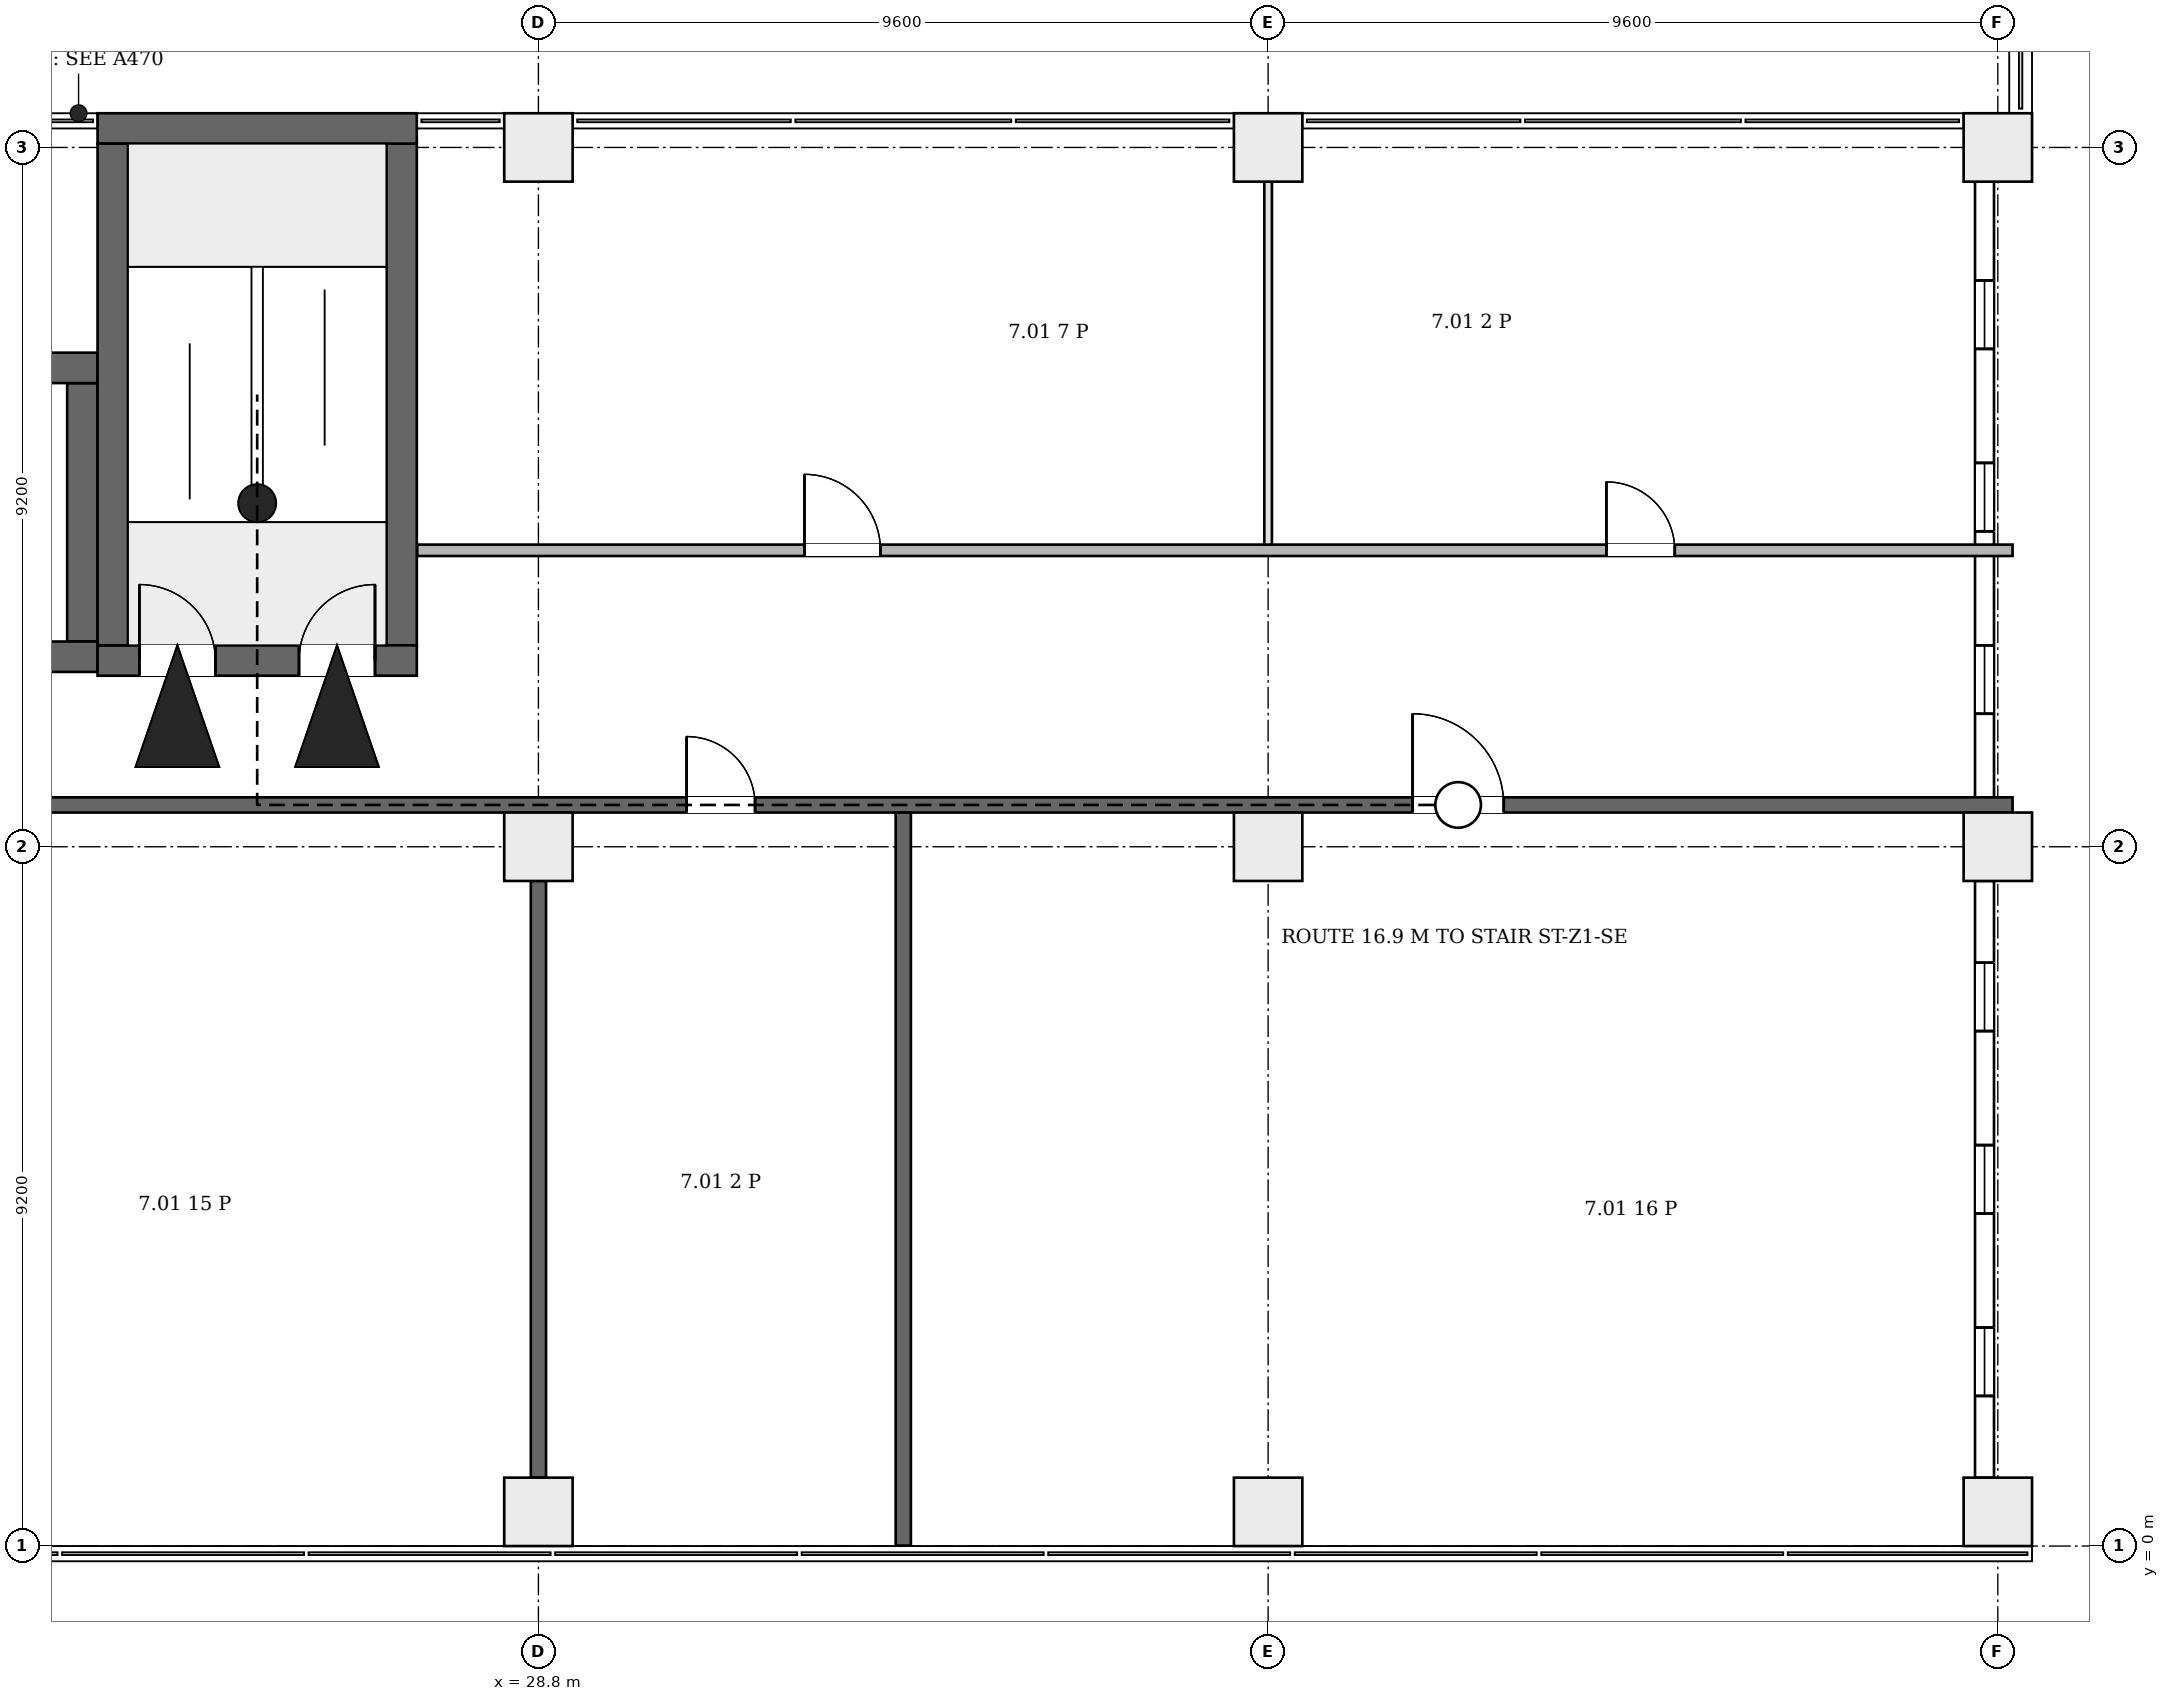
"""IFC4 building model, lengths in metres.
Left out: names, types, materials, properties, quantities, classifications, styles, units other than length and angle.
Written with IfcOpenShell. Run it as: python <this file> out.ifc"""

import sys

from ifc_helpers import new_model, si_unit, direction, frame, frame_2d, origin, origin_2d, place, context, subcontext, project, spatial, rectangle, extrude, element, fill, save


model = new_model("IFC4")
c1 = context("Model", 3, precision=1e-05, world=origin(), true_north=direction((0.0, 1.0)))
c2 = subcontext(c1, "Body", "Model", "MODEL_VIEW")
j1 = project(units=[si_unit("LENGTHUNIT", "METRE"), si_unit("PLANEANGLEUNIT", "RADIAN")], contexts=[c1])
p1 = place(None, origin())
s1 = spatial("IfcSite", under=j1, at=p1, CompositionType="ELEMENT")
p2 = place(p1, origin())
s2 = spatial("IfcBuilding", under=s1, at=p2, CompositionType="ELEMENT")
p3 = place(p2, frame((0.0, 0.0, 40.3)))
s3 = spatial("IfcBuildingStorey", under=s2, at=p3, CompositionType="ELEMENT", Elevation=40.3)
p4 = place(p3, frame((23.0, 11.65, 0.0), z_axis=(0.0, 0.0, 1.0), x_axis=(1.0, 0.0, 0.0)))
e1 = element("IfcWall", 1, at=p4, inside=s3, PredefinedType="SHEAR", context=c2, shape_type="SweptSolid", body=[
    extrude(rectangle(XDim=4.2, YDim=0.4, at=frame_2d((2.1, 0.0))), origin(), (0.0, 0.0, 1.0), 4.2),
])
p5 = place(p4, frame((0.55, 0.0, 0.0)))
e2 = element("IfcOpeningElement", 2, at=p5, cuts=e1, PredefinedType="OPENING", context=c2, shape_type="SweptSolid", body=[
    extrude(rectangle(XDim=1.0, YDim=2.1, at=frame_2d((0.5, 1.05))), frame((0.0, 0.21, 0.0), z_axis=(0.0, -1.0, 0.0), x_axis=(1.0, 0.0, 0.0)), (0.0, 0.0, 1.0), 0.42),
])
p6 = place(p4, frame((2.65, 0.0, 0.0)))
e3 = element("IfcOpeningElement", 3, at=p6, cuts=e1, PredefinedType="OPENING", context=c2, shape_type="SweptSolid", body=[
    extrude(rectangle(XDim=1.0, YDim=2.1, at=frame_2d((0.5, 1.05))), frame((0.0, 0.21, 0.0), z_axis=(0.0, -1.0, 0.0), x_axis=(1.0, 0.0, 0.0)), (0.0, 0.0, 1.0), 0.42),
])
p7 = place(p3, frame((23.0, 18.65, 0.0), z_axis=(0.0, 0.0, 1.0), x_axis=(1.0, 0.0, 0.0)))
e4 = element("IfcWall", 4, at=p7, inside=s3, PredefinedType="SHEAR", context=c2, shape_type="SweptSolid", body=[
    extrude(rectangle(XDim=4.2, YDim=0.4, at=frame_2d((2.1, 0.0))), origin(), (0.0, 0.0, 1.0), 4.2),
])
for number, where, z_axis, x_axis in (
    (5, (23.2, 11.85, 0.0), (0.0, 0.0, 1.0), (0.0, 1.0, 0.0)),
    (6, (27.0, 11.85, 0.0), (0.0, 0.0, 1.0), (0.0, 1.0, 0.0)),
):
    element("IfcWall", number, at=place(p3, frame(where, z_axis=z_axis, x_axis=x_axis)), inside=s3, PredefinedType="SHEAR", context=c2, shape_type="SweptSolid", body=[
        extrude(rectangle(XDim=6.6, YDim=0.4, at=frame_2d((3.3, 0.0))), origin(), (0.0, 0.0, 1.0), 4.2),
    ])
p8 = place(p3, frame((19.9, 11.7, 0.0), z_axis=(0.0, 0.0, 1.0), x_axis=(1.0, 0.0, 0.0)))
e7 = element("IfcWall", 7, at=p8, inside=s3, PredefinedType="SHEAR", context=c2, shape_type="SweptSolid", body=[
    extrude(rectangle(XDim=3.1, YDim=0.4, at=frame_2d((1.55, 0.0))), origin(), (0.0, 0.0, 1.0), 4.2),
])
p9 = place(p3, frame((19.9, 15.5, 0.0), z_axis=(0.0, 0.0, 1.0), x_axis=(1.0, 0.0, 0.0)))
e8 = element("IfcWall", 8, at=p9, inside=s3, PredefinedType="SHEAR", context=c2, shape_type="SweptSolid", body=[
    extrude(rectangle(XDim=3.1, YDim=0.4, at=frame_2d((1.55, 0.0))), origin(), (0.0, 0.0, 1.0), 4.2),
])
p10 = place(p9, frame((0.95, 0.0, 0.0)))
e9 = element("IfcOpeningElement", 9, at=p10, cuts=e8, PredefinedType="OPENING", context=c2, shape_type="SweptSolid", body=[
    extrude(rectangle(XDim=1.2, YDim=2.1, at=frame_2d((0.6, 1.05))), frame((0.0, 0.21, 0.0), z_axis=(0.0, -1.0, 0.0), x_axis=(1.0, 0.0, 0.0)), (0.0, 0.0, 1.0), 0.42),
])
p11 = place(p3, frame((22.8, 11.9, 0.0), z_axis=(0.0, 0.0, 1.0), x_axis=(0.0, 1.0, 0.0)))
e10 = element("IfcWall", 10, at=p11, inside=s3, PredefinedType="SHEAR", context=c2, shape_type="SweptSolid", body=[
    extrude(rectangle(XDim=3.4, YDim=0.4, at=frame_2d((1.7, 0.0))), origin(), (0.0, 0.0, 1.0), 4.2),
])
for number, where, z_axis, x_axis in (
    (11, (28.8, 0.45, 0.0), (0.0, 0.0, 1.0), (1.0, 0.0, 0.0)),
    (12, (38.4, 0.45, 0.0), (0.0, 0.0, 1.0), (1.0, 0.0, 0.0)),
    (13, (48.0, 0.45, 0.0), (0.0, 0.0, 1.0), (1.0, 0.0, 0.0)),
    (14, (28.8, 9.2, 0.0), (0.0, 0.0, 1.0), (1.0, 0.0, 0.0)),
    (15, (38.4, 9.2, 0.0), (0.0, 0.0, 1.0), (1.0, 0.0, 0.0)),
    (16, (48.0, 9.2, 0.0), (0.0, 0.0, 1.0), (1.0, 0.0, 0.0)),
    (17, (28.8, 18.4, 0.0), (0.0, 0.0, 1.0), (1.0, 0.0, 0.0)),
    (18, (38.4, 18.4, 0.0), (0.0, 0.0, 1.0), (1.0, 0.0, 0.0)),
    (19, (48.0, 18.4, 0.0), (0.0, 0.0, 1.0), (1.0, 0.0, 0.0)),
):
    element("IfcColumn", number, at=place(p3, frame(where, z_axis=z_axis, x_axis=x_axis)), inside=s3, PredefinedType="COLUMN", context=c2, shape_type="SweptSolid", body=[
        extrude(rectangle(XDim=0.9, YDim=0.9, at=origin_2d()), origin(), (0.0, 0.0, 1.0), 4.2),
    ])
p12 = place(p3, frame((47.825, 0.9, 0.0), z_axis=(0.0, 0.0, 1.0), x_axis=(0.0, 1.0, 0.0)))
e20 = element("IfcWall", 20, at=p12, inside=s3, PredefinedType="ELEMENTEDWALL", context=c2, shape_type="SweptSolid", body=[
    extrude(rectangle(XDim=7.85, YDim=0.25, at=frame_2d((3.925, 0.0))), origin(), (0.0, 0.0, 1.0), 3.3),
])
p13 = place(p12, frame((1.075, 0.0, 0.6)))
e21 = element("IfcOpeningElement", 21, at=p13, cuts=e20, PredefinedType="OPENING", context=c2, shape_type="SweptSolid", body=[
    extrude(rectangle(XDim=0.9, YDim=2.6, at=frame_2d((0.45, 1.3))), frame((0.0, 0.135, 0.0), z_axis=(0.0, -1.0, 0.0), x_axis=(1.0, 0.0, 0.0)), (0.0, 0.0, 1.0), 0.27),
])
p14 = place(p12, frame((3.475, 0.0, 0.6)))
e22 = element("IfcOpeningElement", 22, at=p14, cuts=e20, PredefinedType="OPENING", context=c2, shape_type="SweptSolid", body=[
    extrude(rectangle(XDim=0.9, YDim=2.6, at=frame_2d((0.45, 1.3))), frame((0.0, 0.135, 0.0), z_axis=(0.0, -1.0, 0.0), x_axis=(1.0, 0.0, 0.0)), (0.0, 0.0, 1.0), 0.27),
])
p15 = place(p12, frame((5.875, 0.0, 0.6)))
e23 = element("IfcOpeningElement", 23, at=p15, cuts=e20, PredefinedType="OPENING", context=c2, shape_type="SweptSolid", body=[
    extrude(rectangle(XDim=0.9, YDim=2.6, at=frame_2d((0.45, 1.3))), frame((0.0, 0.135, 0.0), z_axis=(0.0, -1.0, 0.0), x_axis=(1.0, 0.0, 0.0)), (0.0, 0.0, 1.0), 0.27),
])
p16 = place(p3, frame((47.825, 9.65, 0.0), z_axis=(0.0, 0.0, 1.0), x_axis=(0.0, 1.0, 0.0)))
e24 = element("IfcWall", 24, at=p16, inside=s3, PredefinedType="ELEMENTEDWALL", context=c2, shape_type="SweptSolid", body=[
    extrude(rectangle(XDim=8.3, YDim=0.25, at=frame_2d((4.15, 0.0))), origin(), (0.0, 0.0, 1.0), 3.3),
])
p17 = place(p16, frame((1.3, 0.0, 0.6)))
e25 = element("IfcOpeningElement", 25, at=p17, cuts=e24, PredefinedType="OPENING", context=c2, shape_type="SweptSolid", body=[
    extrude(rectangle(XDim=0.9, YDim=2.6, at=frame_2d((0.45, 1.3))), frame((0.0, 0.135, 0.0), z_axis=(0.0, -1.0, 0.0), x_axis=(1.0, 0.0, 0.0)), (0.0, 0.0, 1.0), 0.27),
])
p18 = place(p16, frame((3.7, 0.0, 0.6)))
e26 = element("IfcOpeningElement", 26, at=p18, cuts=e24, PredefinedType="OPENING", context=c2, shape_type="SweptSolid", body=[
    extrude(rectangle(XDim=0.9, YDim=2.6, at=frame_2d((0.45, 1.3))), frame((0.0, 0.135, 0.0), z_axis=(0.0, -1.0, 0.0), x_axis=(1.0, 0.0, 0.0)), (0.0, 0.0, 1.0), 0.27),
])
p19 = place(p16, frame((6.1, 0.0, 0.6)))
e27 = element("IfcOpeningElement", 27, at=p19, cuts=e24, PredefinedType="OPENING", context=c2, shape_type="SweptSolid", body=[
    extrude(rectangle(XDim=0.9, YDim=2.6, at=frame_2d((0.45, 1.3))), frame((0.0, 0.135, 0.0), z_axis=(0.0, -1.0, 0.0), x_axis=(1.0, 0.0, 0.0)), (0.0, 0.0, 1.0), 0.27),
])
p20 = place(p3, frame((4.3, 9.75, 0.0), z_axis=(0.0, 0.0, 1.0), x_axis=(1.0, 0.0, 0.0)))
e28 = element("IfcWall", 28, at=p20, inside=s3, PredefinedType="PARTITIONING", context=c2, shape_type="SweptSolid", body=[
    extrude(rectangle(XDim=43.894, YDim=0.2, at=frame_2d((21.947, 0.0))), origin(), (0.0, 0.0, 1.0), 3.9),
])
p21 = place(p20, frame((3.65, 0.0, 0.0)))
e29 = element("IfcOpeningElement", 29, at=p21, cuts=e28, PredefinedType="OPENING", context=c2, shape_type="SweptSolid", body=[
    extrude(rectangle(XDim=1.2, YDim=2.1, at=frame_2d((0.6, 1.05))), frame((0.0, 0.11, 0.0), z_axis=(0.0, -1.0, 0.0), x_axis=(1.0, 0.0, 0.0)), (0.0, 0.0, 1.0), 0.22),
])
p22 = place(p20, frame((16.7, 0.0, 0.0)))
e30 = element("IfcOpeningElement", 30, at=p22, cuts=e28, PredefinedType="OPENING", context=c2, shape_type="SweptSolid", body=[
    extrude(rectangle(XDim=1.2, YDim=2.1, at=frame_2d((0.6, 1.05))), frame((0.0, 0.11, 0.0), z_axis=(0.0, -1.0, 0.0), x_axis=(1.0, 0.0, 0.0)), (0.0, 0.0, 1.0), 0.22),
])
p23 = place(p20, frame((26.45, 0.0, 0.0)))
e31 = element("IfcOpeningElement", 31, at=p23, cuts=e28, PredefinedType="OPENING", context=c2, shape_type="SweptSolid", body=[
    extrude(rectangle(XDim=0.9, YDim=2.1, at=frame_2d((0.45, 1.05))), frame((0.0, 0.11, 0.0), z_axis=(0.0, -1.0, 0.0), x_axis=(1.0, 0.0, 0.0)), (0.0, 0.0, 1.0), 0.22),
])
p24 = place(p20, frame((36.0, 0.0, 0.0)))
e32 = element("IfcOpeningElement", 32, at=p24, cuts=e28, PredefinedType="OPENING", context=c2, shape_type="SweptSolid", body=[
    extrude(rectangle(XDim=1.2, YDim=2.1, at=frame_2d((0.6, 1.05))), frame((0.0, 0.11, 0.0), z_axis=(0.0, -1.0, 0.0), x_axis=(1.0, 0.0, 0.0)), (0.0, 0.0, 1.0), 0.22),
])
p25 = place(p3, frame((27.206, 13.1, 0.0), z_axis=(0.0, 0.0, 1.0), x_axis=(1.0, 0.0, 0.0)))
e33 = element("IfcWall", 33, at=p25, inside=s3, PredefinedType="PARTITIONING", context=c2, shape_type="SweptSolid", body=[
    extrude(rectangle(XDim=20.988, YDim=0.15, at=frame_2d((10.494, 0.0))), origin(), (0.0, 0.0, 1.0), 3.9),
])
p26 = place(p25, frame((5.094, 0.0, 0.0)))
e34 = element("IfcOpeningElement", 34, at=p26, cuts=e33, PredefinedType="OPENING", context=c2, shape_type="SweptSolid", body=[
    extrude(rectangle(XDim=1.0, YDim=2.1, at=frame_2d((0.5, 1.05))), frame((0.0, 0.085, 0.0), z_axis=(0.0, -1.0, 0.0), x_axis=(1.0, 0.0, 0.0)), (0.0, 0.0, 1.0), 0.17),
])
p27 = place(p25, frame((15.644, 0.0, 0.0)))
e35 = element("IfcOpeningElement", 35, at=p27, cuts=e33, PredefinedType="OPENING", context=c2, shape_type="SweptSolid", body=[
    extrude(rectangle(XDim=0.9, YDim=2.1, at=frame_2d((0.45, 1.05))), frame((0.0, 0.085, 0.0), z_axis=(0.0, -1.0, 0.0), x_axis=(1.0, 0.0, 0.0)), (0.0, 0.0, 1.0), 0.17),
])
p28 = place(p3, frame((28.8, 0.9, 0.0), z_axis=(0.0, 0.0, 1.0), x_axis=(0.0, 1.0, 0.0)))
e36 = element("IfcWall", 36, at=p28, inside=s3, PredefinedType="PARTITIONING", context=c2, shape_type="SweptSolid", body=[
    extrude(rectangle(XDim=7.85, YDim=0.2, at=frame_2d((3.925, 0.0))), origin(), (0.0, 0.0, 1.0), 3.9),
])
p29 = place(p3, frame((33.6, 0.006, 0.0), z_axis=(0.0, 0.0, 1.0), x_axis=(0.0, 1.0, 0.0)))
e37 = element("IfcWall", 37, at=p29, inside=s3, PredefinedType="PARTITIONING", context=c2, shape_type="SweptSolid", body=[
    extrude(rectangle(XDim=9.644, YDim=0.2, at=frame_2d((4.822, 0.0))), origin(), (0.0, 0.0, 1.0), 3.9),
])
p30 = place(p3, frame((38.4, 13.175, 0.0), z_axis=(0.0, 0.0, 1.0), x_axis=(0.0, 1.0, 0.0)))
e38 = element("IfcWall", 38, at=p30, inside=s3, PredefinedType="PARTITIONING", context=c2, shape_type="SweptSolid", body=[
    extrude(rectangle(XDim=4.775, YDim=0.1, at=frame_2d((2.387, 0.0))), origin(), (0.0, 0.0, 1.0), 3.9),
])
p31 = place(p13, origin())
e39 = element("IfcWindow", 39, at=p31, inside=s3, PartitioningType="SINGLE_PANEL", PredefinedType="WINDOW", context=c2, shape_type="SweptSolid", body=[
    extrude(rectangle(XDim=0.9, YDim=2.6, at=frame_2d((0.45, 1.3))), frame((0.0, 0.03, 0.0), z_axis=(0.0, -1.0, 0.0), x_axis=(1.0, 0.0, 0.0)), (0.0, 0.0, 1.0), 0.06),
])
fill(e21, e39)
p32 = place(p14, origin())
e40 = element("IfcWindow", 40, at=p32, inside=s3, PartitioningType="SINGLE_PANEL", PredefinedType="WINDOW", context=c2, shape_type="SweptSolid", body=[
    extrude(rectangle(XDim=0.9, YDim=2.6, at=frame_2d((0.45, 1.3))), frame((0.0, 0.03, 0.0), z_axis=(0.0, -1.0, 0.0), x_axis=(1.0, 0.0, 0.0)), (0.0, 0.0, 1.0), 0.06),
])
fill(e22, e40)
p33 = place(p15, origin())
e41 = element("IfcWindow", 41, at=p33, inside=s3, PartitioningType="SINGLE_PANEL", PredefinedType="WINDOW", context=c2, shape_type="SweptSolid", body=[
    extrude(rectangle(XDim=0.9, YDim=2.6, at=frame_2d((0.45, 1.3))), frame((0.0, 0.03, 0.0), z_axis=(0.0, -1.0, 0.0), x_axis=(1.0, 0.0, 0.0)), (0.0, 0.0, 1.0), 0.06),
])
fill(e23, e41)
p34 = place(p17, origin())
e42 = element("IfcWindow", 42, at=p34, inside=s3, PartitioningType="SINGLE_PANEL", PredefinedType="WINDOW", context=c2, shape_type="SweptSolid", body=[
    extrude(rectangle(XDim=0.9, YDim=2.6, at=frame_2d((0.45, 1.3))), frame((0.0, 0.03, 0.0), z_axis=(0.0, -1.0, 0.0), x_axis=(1.0, 0.0, 0.0)), (0.0, 0.0, 1.0), 0.06),
])
fill(e25, e42)
p35 = place(p18, origin())
e43 = element("IfcWindow", 43, at=p35, inside=s3, PartitioningType="SINGLE_PANEL", PredefinedType="WINDOW", context=c2, shape_type="SweptSolid", body=[
    extrude(rectangle(XDim=0.9, YDim=2.6, at=frame_2d((0.45, 1.3))), frame((0.0, 0.03, 0.0), z_axis=(0.0, -1.0, 0.0), x_axis=(1.0, 0.0, 0.0)), (0.0, 0.0, 1.0), 0.06),
])
fill(e26, e43)
p36 = place(p19, origin())
e44 = element("IfcWindow", 44, at=p36, inside=s3, PartitioningType="SINGLE_PANEL", PredefinedType="WINDOW", context=c2, shape_type="SweptSolid", body=[
    extrude(rectangle(XDim=0.9, YDim=2.6, at=frame_2d((0.45, 1.3))), frame((0.0, 0.03, 0.0), z_axis=(0.0, -1.0, 0.0), x_axis=(1.0, 0.0, 0.0)), (0.0, 0.0, 1.0), 0.06),
])
fill(e27, e44)
p37 = place(p5, origin())
e45 = element("IfcDoor", 45, at=p37, inside=s3, OperationType="SINGLE_SWING_RIGHT", PredefinedType="DOOR", context=c2, shape_type="SweptSolid", body=[
    extrude(rectangle(XDim=1.0, YDim=2.1, at=frame_2d((0.5, 1.05))), frame((0.0, 0.025, 0.0), z_axis=(0.0, -1.0, 0.0), x_axis=(1.0, 0.0, 0.0)), (0.0, 0.0, 1.0), 0.05),
])
fill(e2, e45)
p38 = place(p6, origin())
e46 = element("IfcDoor", 46, at=p38, inside=s3, OperationType="SINGLE_SWING_LEFT", PredefinedType="DOOR", context=c2, shape_type="SweptSolid", body=[
    extrude(rectangle(XDim=1.0, YDim=2.1, at=frame_2d((0.5, 1.05))), frame((0.0, 0.025, 0.0), z_axis=(0.0, -1.0, 0.0), x_axis=(1.0, 0.0, 0.0)), (0.0, 0.0, 1.0), 0.05),
])
fill(e3, e46)
p39 = place(p23, origin())
e47 = element("IfcDoor", 47, at=p39, inside=s3, OperationType="SINGLE_SWING_LEFT", PredefinedType="DOOR", context=c2, shape_type="SweptSolid", body=[
    extrude(rectangle(XDim=0.9, YDim=2.1, at=frame_2d((0.45, 1.05))), frame((0.0, 0.025, 0.0), z_axis=(0.0, -1.0, 0.0), x_axis=(1.0, 0.0, 0.0)), (0.0, 0.0, 1.0), 0.05),
])
fill(e31, e47)
p40 = place(p24, origin())
e48 = element("IfcDoor", 48, at=p40, inside=s3, OperationType="SINGLE_SWING_LEFT", PredefinedType="DOOR", context=c2, shape_type="SweptSolid", body=[
    extrude(rectangle(XDim=1.2, YDim=2.1, at=frame_2d((0.6, 1.05))), frame((0.0, 0.025, 0.0), z_axis=(0.0, -1.0, 0.0), x_axis=(1.0, 0.0, 0.0)), (0.0, 0.0, 1.0), 0.05),
])
fill(e32, e48)
p41 = place(p26, origin())
e49 = element("IfcDoor", 49, at=p41, inside=s3, OperationType="SINGLE_SWING_LEFT", PredefinedType="DOOR", context=c2, shape_type="SweptSolid", body=[
    extrude(rectangle(XDim=1.0, YDim=2.1, at=frame_2d((0.5, 1.05))), frame((0.0, 0.025, 0.0), z_axis=(0.0, -1.0, 0.0), x_axis=(1.0, 0.0, 0.0)), (0.0, 0.0, 1.0), 0.05),
])
fill(e34, e49)
p42 = place(p27, origin())
e50 = element("IfcDoor", 50, at=p42, inside=s3, OperationType="SINGLE_SWING_RIGHT", PredefinedType="DOOR", context=c2, shape_type="SweptSolid", body=[
    extrude(rectangle(XDim=0.9, YDim=2.1, at=frame_2d((0.45, 1.05))), frame((0.0, 0.025, 0.0), z_axis=(0.0, -1.0, 0.0), x_axis=(1.0, 0.0, 0.0)), (0.0, 0.0, 1.0), 0.05),
])
fill(e35, e50)
save(model, sys.argv[1])
